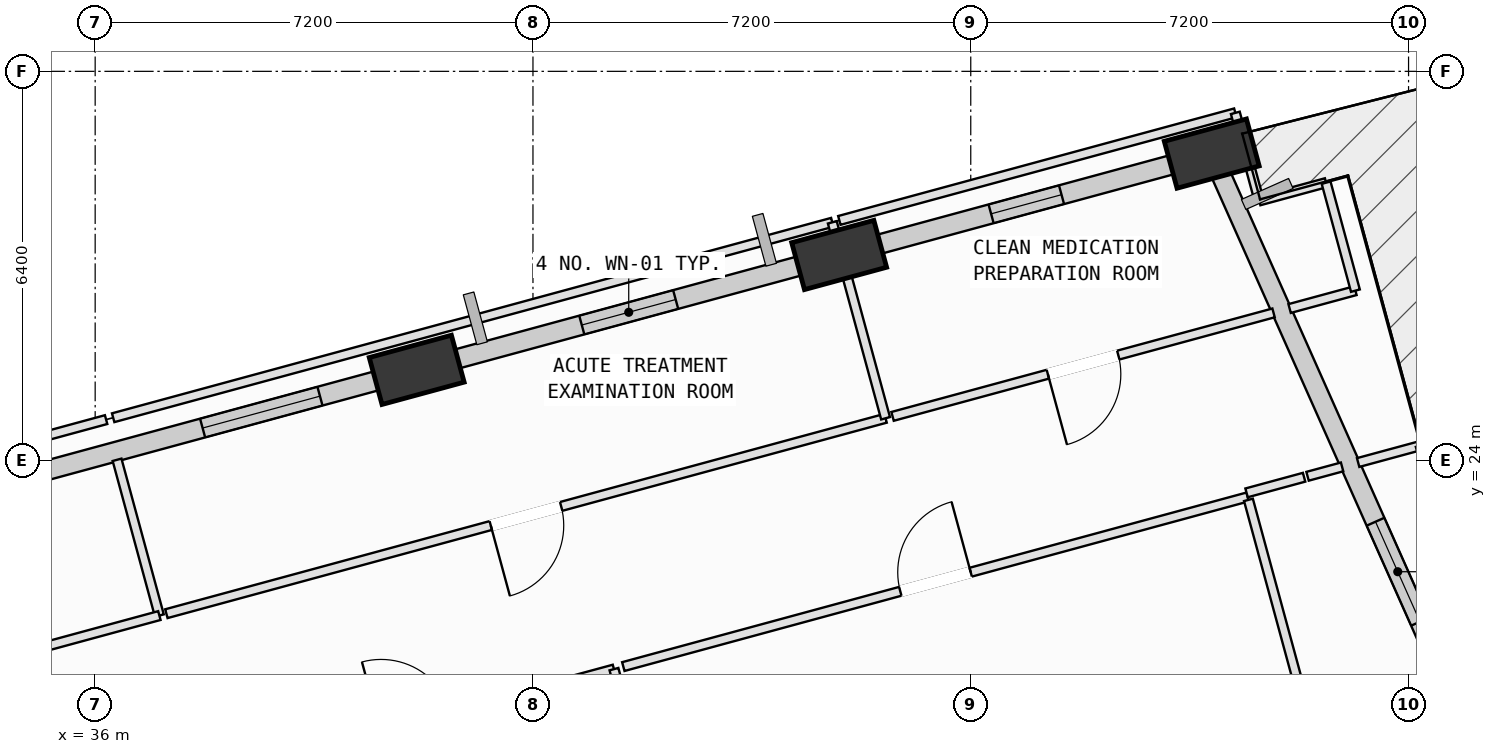
"""IFC4 building model, lengths in metres.
Left out: names, types, materials, properties, quantities, classifications, styles, units other than length and angle.
Written with IfcOpenShell. Run it as: python <this file> out.ifc"""

import sys

from ifc_helpers import new_model, si_unit, direction, frame, frame_2d, origin, origin_2d, place, context, subcontext, project, spatial, rectangle, extrude, element, fill, save


model = new_model("IFC4")
c1 = context("Model", 3, precision=1e-05, world=origin(), true_north=direction((0.0, 1.0)))
c2 = subcontext(c1, "Body", "Model", "MODEL_VIEW")
j1 = project(units=[si_unit("LENGTHUNIT", "METRE"), si_unit("PLANEANGLEUNIT", "RADIAN")], contexts=[c1])
p1 = place(None, origin())
s1 = spatial("IfcSite", under=j1, at=p1, CompositionType="ELEMENT")
p2 = place(p1, origin())
s2 = spatial("IfcBuilding", under=s1, at=p2, CompositionType="ELEMENT")
p3 = place(p2, frame((0.0, 0.0, 88.4)))
s3 = spatial("IfcBuildingStorey", under=s2, at=p3, CompositionType="ELEMENT", Elevation=88.4)
p4 = place(p3, frame((54.363, 29.047, 0.052), z_axis=(-0.018244360098, 0.085551256137, 0.996166715916), x_axis=(-0.8893197332, -0.456710409443, 0.022934996119)))
e1 = element("IfcColumn", 1, at=p4, inside=s3, PredefinedType="COLUMN", context=c2, shape_type="SweptSolid", body=[
    extrude(rectangle(XDim=1.4, YDim=0.8, at=origin_2d()), origin(), (0.0, 0.0, 1.0), 3.961),
])
p5 = place(p3, frame((48.236, 27.38, 0.038), z_axis=(-0.011197400024, 0.060478264967, 0.99810670657), x_axis=(-0.901247683569, -0.433004107727, 0.016126238025)))
e2 = element("IfcColumn", 2, at=p5, inside=s3, PredefinedType="COLUMN", context=c2, shape_type="SweptSolid", body=[
    extrude(rectangle(XDim=1.4, YDim=0.8, at=origin_2d()), origin(), (0.0, 0.0, 1.0), 3.968),
])
p6 = place(p3, frame((41.288, 25.49, 0.021), z_axis=(-0.003128768258, 0.031839818153, 0.999488087367), x_axis=(-0.93476314802, -0.355172485039, 0.008388264129)))
e3 = element("IfcColumn", 3, at=p6, inside=s3, PredefinedType="COLUMN", context=c2, shape_type="SweptSolid", body=[
    extrude(rectangle(XDim=1.4, YDim=0.8, at=origin_2d()), origin(), (0.0, 0.0, 1.0), 3.979),
])
p7 = place(p3, frame((54.495, 28.747, 0.0), z_axis=(0.0, 0.0, 1.0), x_axis=(0.406584404418, -0.913613223462, 0.0)))
e4 = element("IfcWall", 4, at=p7, inside=s3, PredefinedType="SOLIDWALL", context=c2, shape_type="SweptSolid", body=[
    extrude(rectangle(XDim=8.838, YDim=0.32, at=frame_2d((4.419, 0.0))), origin(), (0.0, 0.0, 1.0), 3.165),
])
p8 = place(p7, frame((6.299, 0.0, 0.75)))
e5 = element("IfcOpeningElement", 5, at=p8, cuts=e4, PredefinedType="OPENING", context=c2, shape_type="SweptSolid", body=[
    extrude(rectangle(XDim=1.8, YDim=2.05, at=frame_2d((0.9, 1.025))), frame((0.0, 0.17, 0.0), z_axis=(0.0, -1.0, 0.0), x_axis=(1.0, 0.0, 0.0)), (0.0, 0.0, 1.0), 0.34),
])
p9 = place(p3, frame((48.71, 27.506, 0.0), z_axis=(0.0, 0.0, 1.0), x_axis=(0.965018764752, 0.262180822479, 0.0)))
e6 = element("IfcWall", 6, at=p9, inside=s3, PredefinedType="SOLIDWALL", context=c2, shape_type="SweptSolid", body=[
    extrude(rectangle(XDim=5.405, YDim=0.32, at=frame_2d((2.702, 0.0))), origin(), (0.0, 0.0, 1.0), 2.765),
])
p10 = place(p9, frame((2.098, 0.0, 0.75)))
e7 = element("IfcOpeningElement", 7, at=p10, cuts=e6, PredefinedType="OPENING", context=c2, shape_type="SweptSolid", body=[
    extrude(rectangle(XDim=1.2, YDim=1.75, at=frame_2d((0.6, 0.875))), frame((0.0, 0.17, 0.0), z_axis=(0.0, -1.0, 0.0), x_axis=(1.0, 0.0, 0.0)), (0.0, 0.0, 1.0), 0.34),
])
p11 = place(p3, frame((41.773, 25.622, 0.0), z_axis=(0.0, 0.0, 1.0), x_axis=(0.965013128286, 0.262201567951, 0.0)))
e8 = element("IfcWall", 8, at=p11, inside=s3, PredefinedType="SOLIDWALL", context=c2, shape_type="SweptSolid", body=[
    extrude(rectangle(XDim=6.226, YDim=0.32, at=frame_2d((3.113, 0.0))), origin(), (0.0, 0.0, 1.0), 3.165),
])
p12 = place(p11, frame((2.31, 0.0, 0.75)))
e9 = element("IfcOpeningElement", 9, at=p12, cuts=e8, PredefinedType="OPENING", context=c2, shape_type="SweptSolid", body=[
    extrude(rectangle(XDim=1.6, YDim=1.95, at=frame_2d((0.8, 0.975))), frame((0.0, 0.17, 0.0), z_axis=(0.0, -1.0, 0.0), x_axis=(1.0, 0.0, 0.0)), (0.0, 0.0, 1.0), 0.34),
])
p13 = place(p3, frame((34.83, 23.735, 0.0), z_axis=(0.0, 0.0, 1.0), x_axis=(0.965020065413, 0.262176035042, 0.0)))
e10 = element("IfcWall", 10, at=p13, inside=s3, PredefinedType="SOLIDWALL", context=c2, shape_type="SweptSolid", body=[
    extrude(rectangle(XDim=6.211, YDim=0.32, at=frame_2d((3.105, 0.0))), origin(), (0.0, 0.0, 1.0), 3.165),
])
p14 = place(p13, frame((3.044, 0.0, 0.75)))
e11 = element("IfcOpeningElement", 11, at=p14, cuts=e10, PredefinedType="OPENING", context=c2, shape_type="SweptSolid", body=[
    extrude(rectangle(XDim=2.0, YDim=1.95, at=frame_2d((1.0, 0.975))), frame((0.0, 0.17, 0.0), z_axis=(0.0, -1.0, 0.0), x_axis=(1.0, 0.0, 0.0)), (0.0, 0.0, 1.0), 0.34),
])
p15 = place(p3, frame((38.03, 18.802, 0.0), z_axis=(0.0, 0.0, 1.0), x_axis=(0.965032576147, 0.26212998107, 0.0)))
e12 = element("IfcWall", 12, at=p15, inside=s3, PredefinedType="PARTITIONING", context=c2, shape_type="SweptSolid", body=[
    extrude(rectangle(XDim=6.738, YDim=0.15, at=frame_2d((3.369, 0.0))), origin(), (0.0, 0.0, 1.0), 2.765),
])
p16 = place(p15, frame((2.769, 0.0, 0.0)))
e13 = element("IfcOpeningElement", 13, at=p16, cuts=e12, PredefinedType="OPENING", context=c2, shape_type="SweptSolid", body=[
    extrude(rectangle(XDim=1.2, YDim=2.15, at=frame_2d((0.6, 1.075))), frame((0.0, 0.085, 0.0), z_axis=(0.0, -1.0, 0.0), x_axis=(1.0, 0.0, 0.0)), (0.0, 0.0, 1.0), 0.17),
])
p17 = place(p3, frame((44.532, 20.568, 0.0), z_axis=(0.0, 0.0, 1.0), x_axis=(0.262195036903, -0.965014902799, 0.0)))
e14 = element("IfcWall", 14, at=p17, inside=s3, PredefinedType="PARTITIONING", context=c2, shape_type="SweptSolid", body=[
    extrude(rectangle(XDim=15.165, YDim=0.15, at=frame_2d((7.582, 0.0))), origin(), (0.0, 0.0, 1.0), 3.78),
])
p18 = place(p3, frame((44.686, 20.61, 0.0), z_axis=(0.0, 0.0, 1.0), x_axis=(0.965015946981, 0.262191193736, 0.0)))
e15 = element("IfcWall", 15, at=p18, inside=s3, PredefinedType="PARTITIONING", context=c2, shape_type="SweptSolid", body=[
    extrude(rectangle(XDim=10.64, YDim=0.15, at=frame_2d((5.32, 0.0))), origin(), (0.0, 0.0, 1.0), 3.78),
])
p19 = place(p18, frame((4.72, 0.0, 0.0)))
e16 = element("IfcOpeningElement", 16, at=p19, cuts=e15, PredefinedType="OPENING", context=c2, shape_type="SweptSolid", body=[
    extrude(rectangle(XDim=1.2, YDim=2.15, at=frame_2d((0.6, 1.075))), frame((0.0, 0.085, 0.0), z_axis=(0.0, -1.0, 0.0), x_axis=(1.0, 0.0, 0.0)), (0.0, 0.0, 1.0), 0.17),
])
p20 = place(p3, frame((54.967, 23.352, 0.0), z_axis=(0.0, 0.0, 1.0), x_axis=(0.262211478989, -0.965010435325, 0.0)))
e17 = element("IfcWall", 17, at=p20, inside=s3, PredefinedType="PARTITIONING", context=c2, shape_type="SweptSolid", body=[
    extrude(rectangle(XDim=13.798, YDim=0.15, at=frame_2d((6.899, 0.0))), origin(), (0.0, 0.0, 1.0), 3.78),
])
p21 = place(p3, frame((36.36, 24.011, 0.0), z_axis=(0.0, 0.0, 1.0), x_axis=(0.262090118072, -0.965043403174, 0.0)))
e18 = element("IfcWall", 18, at=p21, inside=s3, PredefinedType="PARTITIONING", context=c2, shape_type="SweptSolid", body=[
    extrude(rectangle(XDim=2.655, YDim=0.15, at=frame_2d((1.327, 0.0))), origin(), (0.0, 0.0, 1.0), 3.78),
])
p22 = place(p3, frame((37.056, 21.449, 0.0), z_axis=(0.0, 0.0, 1.0), x_axis=(-0.965014994537, -0.262194699256, 0.0)))
e19 = element("IfcWall", 19, at=p22, inside=s3, PredefinedType="PARTITIONING", context=c2, shape_type="SweptSolid", body=[
    extrude(rectangle(XDim=3.314, YDim=0.15, at=frame_2d((1.657, 0.0))), origin(), (0.0, 0.0, 1.0), 3.78),
])
p23 = place(p3, frame((28.02, 22.455, 0.0), z_axis=(0.0, 0.0, 1.0), x_axis=(0.965015238814, 0.262193800188, 0.0)))
e20 = element("IfcWall", 20, at=p23, inside=s3, PredefinedType="PARTITIONING", context=c2, shape_type="SweptSolid", body=[
    extrude(rectangle(XDim=8.456, YDim=0.15, at=frame_2d((4.228, 0.0))), origin(), (0.0, 0.0, 1.0), 3.78),
])
p24 = place(p3, frame((48.999, 24.694, 0.0), z_axis=(0.0, 0.0, 1.0), x_axis=(-0.965006566945, -0.262225715279, 0.0)))
e21 = element("IfcWall", 21, at=p24, inside=s3, PredefinedType="PARTITIONING", context=c2, shape_type="SweptSolid", body=[
    extrude(rectangle(XDim=12.257, YDim=0.15, at=frame_2d((6.128, 0.0))), origin(), (0.0, 0.0, 1.0), 2.765),
])
p25 = place(p24, frame((5.528, 0.0, 0.0)))
e22 = element("IfcOpeningElement", 22, at=p25, cuts=e21, PredefinedType="OPENING", context=c2, shape_type="SweptSolid", body=[
    extrude(rectangle(XDim=1.2, YDim=2.15, at=frame_2d((0.6, 1.075))), frame((0.0, 0.085, 0.0), z_axis=(0.0, -1.0, 0.0), x_axis=(1.0, 0.0, 0.0)), (0.0, 0.0, 1.0), 0.17),
])
p26 = place(p3, frame((36.296, 24.703, 0.0), z_axis=(0.0, 0.0, 1.0), x_axis=(0.965001087771, 0.262245878138, 0.0)))
e23 = element("IfcWall", 23, at=p26, inside=s3, PredefinedType="PARTITIONING", context=c2, shape_type="SweptSolid", body=[
    extrude(rectangle(XDim=12.256, YDim=0.15, at=frame_2d((6.128, 0.0))), origin(), (0.0, 0.0, 1.0), 3.165),
])
p27 = place(p3, frame((48.123, 27.917, 0.0), z_axis=(0.0, 0.0, 1.0), x_axis=(0.262282281964, -0.964991194036, 0.0)))
e24 = element("IfcWall", 24, at=p27, inside=s3, PredefinedType="PARTITIONING", context=c2, shape_type="SweptSolid", body=[
    extrude(rectangle(XDim=3.34, YDim=0.15, at=frame_2d((1.67, 0.0))), origin(), (0.0, 0.0, 1.0), 3.78),
])
p28 = place(p3, frame((56.726, 26.793, 0.0), z_axis=(0.0, 0.0, 1.0), x_axis=(-0.965024633798, -0.262159219109, 0.0)))
e25 = element("IfcWall", 25, at=p28, inside=s3, PredefinedType="PARTITIONING", context=c2, shape_type="SweptSolid", body=[
    extrude(rectangle(XDim=1.121, YDim=0.15, at=frame_2d((0.561, 0.0))), origin(), (0.0, 0.0, 1.0), 3.78),
])
p29 = place(p3, frame((55.38, 26.427, 0.0), z_axis=(0.0, 0.0, 1.0), x_axis=(-0.965035768329, -0.262118228756, 0.0)))
e26 = element("IfcWall", 26, at=p29, inside=s3, PredefinedType="PARTITIONING", context=c2, shape_type="SweptSolid", body=[
    extrude(rectangle(XDim=6.493, YDim=0.15, at=frame_2d((3.247, 0.0))), origin(), (0.0, 0.0, 1.0), 3.78),
])
p30 = place(p29, frame((2.646, 0.0, 0.0)))
e27 = element("IfcOpeningElement", 27, at=p30, cuts=e26, PredefinedType="OPENING", context=c2, shape_type="SweptSolid", body=[
    extrude(rectangle(XDim=1.2, YDim=2.15, at=frame_2d((0.6, 1.075))), frame((0.0, 0.085, 0.0), z_axis=(0.0, -1.0, 0.0), x_axis=(1.0, 0.0, 0.0)), (0.0, 0.0, 1.0), 0.17),
])
p31 = place(p3, frame((48.239, 27.948, 0.0), z_axis=(0.0, 0.0, 1.0), x_axis=(0.965024675102, 0.262159067064, 0.0)))
e28 = element("IfcWall", 28, at=p31, inside=s3, PredefinedType="PARTITIONING", context=c2, shape_type="SweptSolid", body=[
    extrude(rectangle(XDim=6.748, YDim=0.15, at=frame_2d((3.374, 0.0))), origin(), (0.0, 0.0, 1.0), 2.765),
])
p32 = place(p3, frame((54.751, 29.717, 0.0), z_axis=(0.0, 0.0, 1.0), x_axis=(0.262139102187, -0.965030098549, 0.0)))
e29 = element("IfcWall", 29, at=p32, inside=s3, PredefinedType="PARTITIONING", context=c2, shape_type="SweptSolid", body=[
    extrude(rectangle(XDim=1.5, YDim=0.15, at=frame_2d((0.75, 0.0))), origin(), (0.0, 0.0, 1.0), 3.165),
])
p33 = place(p3, frame((55.144, 28.27, 0.0), z_axis=(0.0, 0.0, 1.0), x_axis=(0.964961269927, 0.262392354198, 0.0)))
e30 = element("IfcWall", 30, at=p33, inside=s3, PredefinedType="PARTITIONING", context=c2, shape_type="SweptSolid", body=[
    extrude(rectangle(XDim=1.14, YDim=0.15, at=frame_2d((0.57, 0.0))), origin(), (0.0, 0.0, 1.0), 3.78),
])
p34 = place(p3, frame((56.244, 28.569, 0.0), z_axis=(0.0, 0.0, 1.0), x_axis=(0.261994757471, -0.965069296506, 0.0)))
e31 = element("IfcWall", 31, at=p34, inside=s3, PredefinedType="PARTITIONING", context=c2, shape_type="SweptSolid", body=[
    extrude(rectangle(XDim=1.84, YDim=0.15, at=frame_2d((0.92, 0.0))), origin(), (0.0, 0.0, 1.0), 3.78),
])
p35 = place(p3, frame((54.936, 23.467, 0.0), z_axis=(0.0, 0.0, 1.0), x_axis=(0.965004786222, 0.262232268359, 0.0)))
e32 = element("IfcWall", 32, at=p35, inside=s3, PredefinedType="PARTITIONING", context=c2, shape_type="SweptSolid", body=[
    extrude(rectangle(XDim=0.98, YDim=0.15, at=frame_2d((0.49, 0.0))), origin(), (0.0, 0.0, 1.0), 3.78),
])
p36 = place(p3, frame((55.939, 23.74, 0.0), z_axis=(0.0, 0.0, 1.0), x_axis=(0.965145654962, 0.261713325432, 0.0)))
e33 = element("IfcWall", 33, at=p36, inside=s3, PredefinedType="PARTITIONING", context=c2, shape_type="SweptSolid", body=[
    extrude(rectangle(XDim=0.589, YDim=0.15, at=frame_2d((0.294, 0.0))), origin(), (0.0, 0.0, 1.0), 3.78),
])
p37 = place(p3, frame((56.771, 23.966, 0.0), z_axis=(0.0, 0.0, 1.0), x_axis=(0.965146256192, 0.261711108207, 0.0)))
e34 = element("IfcWall", 34, at=p37, inside=s3, PredefinedType="PARTITIONING", context=c2, shape_type="SweptSolid", body=[
    extrude(rectangle(XDim=1.058, YDim=0.15, at=frame_2d((0.529, 0.0))), origin(), (0.0, 0.0, 1.0), 3.78),
])
p38 = place(p3, frame((57.792, 24.243, 0.0), z_axis=(0.0, 0.0, 1.0), x_axis=(0.26223396033, -0.965004326441, 0.0)))
e35 = element("IfcWall", 35, at=p38, inside=s3, PredefinedType="PARTITIONING", context=c2, shape_type="SweptSolid", body=[
    extrude(rectangle(XDim=7.039, YDim=0.15, at=frame_2d((3.52, 0.0))), origin(), (0.0, 0.0, 1.0), 3.165),
])
p39 = place(p8, origin())
e36 = element("IfcWindow", 36, at=p39, inside=s3, PartitioningType="SINGLE_PANEL", PredefinedType="WINDOW", context=c2, shape_type="SweptSolid", body=[
    extrude(rectangle(XDim=1.8, YDim=2.05, at=frame_2d((0.9, 1.025))), frame((0.0, 0.03, 0.0), z_axis=(0.0, -1.0, 0.0), x_axis=(1.0, 0.0, 0.0)), (0.0, 0.0, 1.0), 0.06),
])
fill(e5, e36)
p40 = place(p10, origin())
e37 = element("IfcWindow", 37, at=p40, inside=s3, PartitioningType="SINGLE_PANEL", PredefinedType="WINDOW", context=c2, shape_type="SweptSolid", body=[
    extrude(rectangle(XDim=1.2, YDim=1.75, at=frame_2d((0.6, 0.875))), frame((0.0, 0.03, 0.0), z_axis=(0.0, -1.0, 0.0), x_axis=(1.0, 0.0, 0.0)), (0.0, 0.0, 1.0), 0.06),
])
fill(e7, e37)
p41 = place(p12, origin())
e38 = element("IfcWindow", 38, at=p41, inside=s3, PartitioningType="SINGLE_PANEL", PredefinedType="WINDOW", context=c2, shape_type="SweptSolid", body=[
    extrude(rectangle(XDim=1.6, YDim=1.95, at=frame_2d((0.8, 0.975))), frame((0.0, 0.03, 0.0), z_axis=(0.0, -1.0, 0.0), x_axis=(1.0, 0.0, 0.0)), (0.0, 0.0, 1.0), 0.06),
])
fill(e9, e38)
p42 = place(p14, origin())
e39 = element("IfcWindow", 39, at=p42, inside=s3, PartitioningType="SINGLE_PANEL", PredefinedType="WINDOW", context=c2, shape_type="SweptSolid", body=[
    extrude(rectangle(XDim=2.0, YDim=1.95, at=frame_2d((1.0, 0.975))), frame((0.0, 0.03, 0.0), z_axis=(0.0, -1.0, 0.0), x_axis=(1.0, 0.0, 0.0)), (0.0, 0.0, 1.0), 0.06),
])
fill(e11, e39)
p43 = place(p19, origin())
e40 = element("IfcDoor", 40, at=p43, inside=s3, OperationType="SINGLE_SWING_RIGHT", PredefinedType="DOOR", context=c2, shape_type="SweptSolid", body=[
    extrude(rectangle(XDim=1.2, YDim=2.15, at=frame_2d((0.6, 1.075))), frame((0.0, 0.025, 0.0), z_axis=(0.0, -1.0, 0.0), x_axis=(1.0, 0.0, 0.0)), (0.0, 0.0, 1.0), 0.05),
])
fill(e16, e40)
p44 = place(p25, origin())
e41 = element("IfcDoor", 41, at=p44, inside=s3, OperationType="SINGLE_SWING_RIGHT", PredefinedType="DOOR", context=c2, shape_type="SweptSolid", body=[
    extrude(rectangle(XDim=1.2, YDim=2.15, at=frame_2d((0.6, 1.075))), frame((0.0, 0.025, 0.0), z_axis=(0.0, -1.0, 0.0), x_axis=(1.0, 0.0, 0.0)), (0.0, 0.0, 1.0), 0.05),
])
fill(e22, e41)
p45 = place(p30, origin())
e42 = element("IfcDoor", 42, at=p45, inside=s3, OperationType="SINGLE_SWING_RIGHT", PredefinedType="DOOR", context=c2, shape_type="SweptSolid", body=[
    extrude(rectangle(XDim=1.2, YDim=2.15, at=frame_2d((0.6, 1.075))), frame((0.0, 0.025, 0.0), z_axis=(0.0, -1.0, 0.0), x_axis=(1.0, 0.0, 0.0)), (0.0, 0.0, 1.0), 0.05),
])
fill(e27, e42)
save(model, sys.argv[1])
